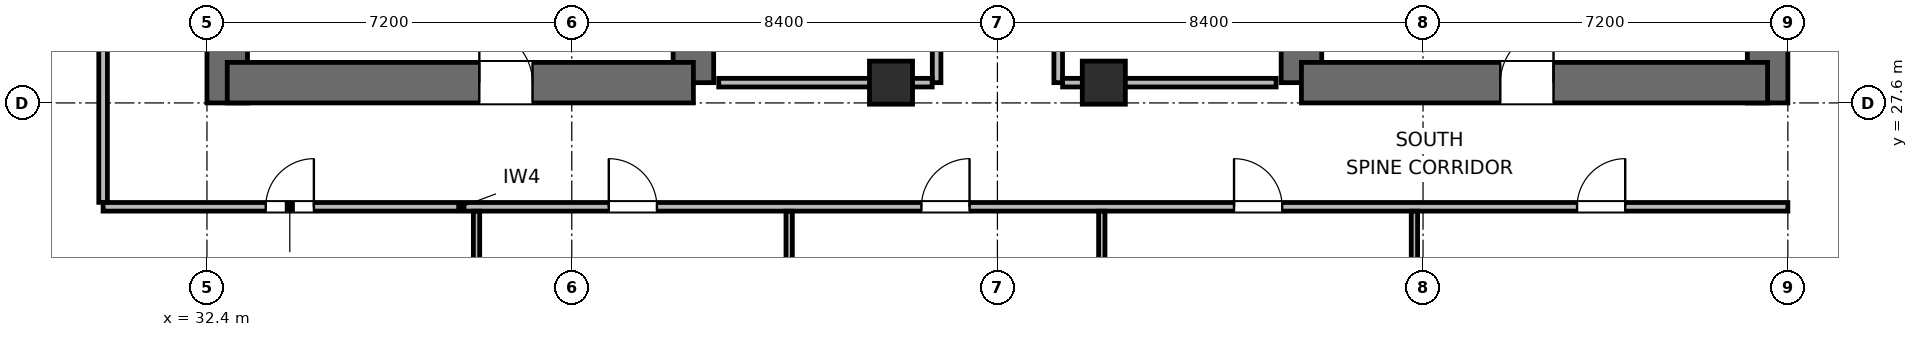
"""IFC4 building model, lengths in metres.
Left out: names, types, materials, properties, quantities, classifications, styles, units other than length and angle.
Written with IfcOpenShell. Run it as: python <this file> out.ifc"""

import sys

from ifc_helpers import new_model, si_unit, direction, frame, frame_2d, origin, origin_2d, place, context, subcontext, project, spatial, rectangle, extrude, element, fill, save


model = new_model("IFC4")
c1 = context("Model", 3, precision=1e-05, world=origin(), true_north=direction((0.0, 1.0)))
c2 = subcontext(c1, "Body", "Model", "MODEL_VIEW")
j1 = project(units=[si_unit("LENGTHUNIT", "METRE"), si_unit("PLANEANGLEUNIT", "RADIAN")], contexts=[c1])
p1 = place(None, origin())
s1 = spatial("IfcSite", under=j1, at=p1, CompositionType="ELEMENT")
p2 = place(p1, origin())
s2 = spatial("IfcBuilding", under=s1, at=p2, CompositionType="ELEMENT")
p3 = place(p2, frame((0.0, 0.0, 141.6)))
s3 = spatial("IfcBuildingStorey", under=s2, at=p3, CompositionType="ELEMENT", Elevation=141.6)
p4 = place(p3, frame((32.8, 27.6, 0.0), z_axis=(0.0, 0.0, 1.0), x_axis=(0.0, 1.0, 0.0)))
e1 = element("IfcWall", 1, at=p4, inside=s3, PredefinedType="SHEAR", context=c2, shape_type="SweptSolid", body=[
    extrude(rectangle(XDim=16.8, YDim=0.8, at=frame_2d((8.4, 0.0))), origin(), (0.0, 0.0, 1.0), 3.9),
])
p5 = place(p3, frame((42.0, 28.0, 0.0), z_axis=(0.0, 0.0, 1.0), x_axis=(0.0, 1.0, 0.0)))
e2 = element("IfcWall", 2, at=p5, inside=s3, PredefinedType="SHEAR", context=c2, shape_type="SweptSolid", body=[
    extrude(rectangle(XDim=6.4, YDim=0.8, at=frame_2d((3.2, 0.0))), origin(), (0.0, 0.0, 1.0), 3.9),
])
p6 = place(p3, frame((32.8, 28.0, 0.0), z_axis=(0.0, 0.0, 1.0), x_axis=(1.0, 0.0, 0.0)))
e3 = element("IfcWall", 3, at=p6, inside=s3, PredefinedType="SHEAR", context=c2, shape_type="SweptSolid", body=[
    extrude(rectangle(XDim=9.2, YDim=0.8, at=frame_2d((4.6, 0.0))), origin(), (0.0, 0.0, 1.0), 3.9),
])
p7 = place(p6, frame((4.975, 0.0, 0.0)))
e4 = element("IfcOpeningElement", 4, at=p7, cuts=e3, PredefinedType="OPENING", context=c2, shape_type="SweptSolid", body=[
    extrude(rectangle(XDim=1.05, YDim=2.04, at=frame_2d((0.525, 1.02))), frame((0.0, 0.41, 0.0), z_axis=(0.0, -1.0, 0.0), x_axis=(1.0, 0.0, 0.0)), (0.0, 0.0, 1.0), 0.82),
])
p8 = place(p3, frame((54.0, 28.0, 0.0), z_axis=(0.0, 0.0, 1.0), x_axis=(0.0, 1.0, 0.0)))
e5 = element("IfcWall", 5, at=p8, inside=s3, PredefinedType="SHEAR", context=c2, shape_type="SweptSolid", body=[
    extrude(rectangle(XDim=7.8, YDim=0.8, at=frame_2d((3.9, 0.0))), origin(), (0.0, 0.0, 1.0), 3.9),
])
p9 = place(p3, frame((63.2, 27.6, 0.0), z_axis=(0.0, 0.0, 1.0), x_axis=(0.0, 1.0, 0.0)))
e6 = element("IfcWall", 6, at=p9, inside=s3, PredefinedType="SHEAR", context=c2, shape_type="SweptSolid", body=[
    extrude(rectangle(XDim=16.8, YDim=0.8, at=frame_2d((8.4, 0.0))), origin(), (0.0, 0.0, 1.0), 3.9),
])
p10 = place(p3, frame((54.0, 28.0, 0.0), z_axis=(0.0, 0.0, 1.0), x_axis=(1.0, 0.0, 0.0)))
e7 = element("IfcWall", 7, at=p10, inside=s3, PredefinedType="SHEAR", context=c2, shape_type="SweptSolid", body=[
    extrude(rectangle(XDim=9.2, YDim=0.8, at=frame_2d((4.6, 0.0))), origin(), (0.0, 0.0, 1.0), 3.9),
])
p11 = place(p10, frame((3.925, 0.0, 0.0)))
e8 = element("IfcOpeningElement", 8, at=p11, cuts=e7, PredefinedType="OPENING", context=c2, shape_type="SweptSolid", body=[
    extrude(rectangle(XDim=1.05, YDim=2.04, at=frame_2d((0.525, 1.02))), frame((0.0, 0.41, 0.0), z_axis=(0.0, -1.0, 0.0), x_axis=(1.0, 0.0, 0.0)), (0.0, 0.0, 1.0), 0.82),
])
for number, where, z_axis, x_axis in (
    (9, (45.9, 28.0, 0.0), (0.0, 0.0, 1.0), (1.0, 0.0, 0.0)),
    (10, (50.1, 28.0, 0.0), (0.0, 0.0, 1.0), (1.0, 0.0, 0.0)),
):
    element("IfcColumn", number, at=place(p3, frame(where, z_axis=z_axis, x_axis=x_axis)), inside=s3, PredefinedType="COLUMN", context=c2, shape_type="SweptSolid", body=[
        extrude(rectangle(XDim=0.85, YDim=0.85, at=origin_2d()), origin(), (0.0, 0.0, 1.0), 3.9),
    ])
p12 = place(p3, frame((46.8, 28.0, 0.0), z_axis=(0.0, 0.0, 1.0), x_axis=(0.0, 1.0, 0.0)))
e11 = element("IfcWall", 11, at=p12, inside=s3, PredefinedType="PARTITIONING", context=c2, shape_type="SweptSolid", body=[
    extrude(rectangle(XDim=4.5, YDim=0.17, at=frame_2d((2.25, 0.0))), origin(), (0.0, 0.0, 1.0), 3.6),
])
p13 = place(p12, frame((0.675, 0.0, 0.0)))
e12 = element("IfcOpeningElement", 12, at=p13, cuts=e11, PredefinedType="OPENING", context=c2, shape_type="SweptSolid", body=[
    extrude(rectangle(XDim=0.9, YDim=2.02, at=frame_2d((0.45, 1.01))), frame((0.0, 0.095, 0.0), z_axis=(0.0, -1.0, 0.0), x_axis=(1.0, 0.0, 0.0)), (0.0, 0.0, 1.0), 0.19),
])
p14 = place(p12, frame((2.925, 0.0, 0.0)))
e13 = element("IfcOpeningElement", 13, at=p14, cuts=e11, PredefinedType="OPENING", context=c2, shape_type="SweptSolid", body=[
    extrude(rectangle(XDim=0.9, YDim=2.02, at=frame_2d((0.45, 1.01))), frame((0.0, 0.095, 0.0), z_axis=(0.0, -1.0, 0.0), x_axis=(1.0, 0.0, 0.0)), (0.0, 0.0, 1.0), 0.19),
])
p15 = place(p3, frame((42.5, 28.0, 0.0), z_axis=(0.0, 0.0, 1.0), x_axis=(1.0, 0.0, 0.0)))
e14 = element("IfcWall", 14, at=p15, inside=s3, PredefinedType="PARTITIONING", context=c2, shape_type="SweptSolid", body=[
    extrude(rectangle(XDim=4.213, YDim=0.17, at=frame_2d((2.106, 0.0))), origin(), (0.0, 0.0, 1.0), 2.485),
])
p16 = place(p3, frame((49.2, 28.0, 0.0), z_axis=(0.0, 0.0, 1.0), x_axis=(0.0, 1.0, 0.0)))
e15 = element("IfcWall", 15, at=p16, inside=s3, PredefinedType="PARTITIONING", context=c2, shape_type="SweptSolid", body=[
    extrude(rectangle(XDim=4.5, YDim=0.17, at=frame_2d((2.25, 0.0))), origin(), (0.0, 0.0, 1.0), 3.6),
])
p17 = place(p16, frame((1.8, 0.0, 0.0)))
e16 = element("IfcOpeningElement", 16, at=p17, cuts=e15, PredefinedType="OPENING", context=c2, shape_type="SweptSolid", body=[
    extrude(rectangle(XDim=0.9, YDim=2.02, at=frame_2d((0.45, 1.01))), frame((0.0, 0.095, 0.0), z_axis=(0.0, -1.0, 0.0), x_axis=(1.0, 0.0, 0.0)), (0.0, 0.0, 1.0), 0.19),
])
p18 = place(p3, frame((49.287, 28.0, 0.0), z_axis=(0.0, 0.0, 1.0), x_axis=(1.0, 0.0, 0.0)))
e17 = element("IfcWall", 17, at=p18, inside=s3, PredefinedType="PARTITIONING", context=c2, shape_type="SweptSolid", body=[
    extrude(rectangle(XDim=4.213, YDim=0.17, at=frame_2d((2.106, 0.0))), origin(), (0.0, 0.0, 1.0), 2.485),
])
p19 = place(p3, frame((30.35, 25.55, 0.0), z_axis=(0.0, 0.0, 1.0), x_axis=(1.0, 0.0, 0.0)))
e18 = element("IfcWall", 18, at=p19, inside=s3, PredefinedType="PARTITIONING", context=c2, shape_type="SweptSolid", body=[
    extrude(rectangle(XDim=33.25, YDim=0.17, at=frame_2d((16.625, 0.0))), origin(), (0.0, 0.0, 1.0), 3.6),
])
p20 = place(p19, frame((3.21, 0.0, 0.0)))
e19 = element("IfcOpeningElement", 19, at=p20, cuts=e18, PredefinedType="OPENING", context=c2, shape_type="SweptSolid", body=[
    extrude(rectangle(XDim=0.95, YDim=2.04, at=frame_2d((0.475, 1.02))), frame((0.0, 0.095, 0.0), z_axis=(0.0, -1.0, 0.0), x_axis=(1.0, 0.0, 0.0)), (0.0, 0.0, 1.0), 0.19),
])
p21 = place(p19, frame((9.98, 0.0, 0.0)))
e20 = element("IfcOpeningElement", 20, at=p21, cuts=e18, PredefinedType="OPENING", context=c2, shape_type="SweptSolid", body=[
    extrude(rectangle(XDim=0.95, YDim=2.04, at=frame_2d((0.475, 1.02))), frame((0.0, 0.095, 0.0), z_axis=(0.0, -1.0, 0.0), x_axis=(1.0, 0.0, 0.0)), (0.0, 0.0, 1.0), 0.19),
])
p22 = place(p19, frame((16.15, 0.0, 0.0)))
e21 = element("IfcOpeningElement", 21, at=p22, cuts=e18, PredefinedType="OPENING", context=c2, shape_type="SweptSolid", body=[
    extrude(rectangle(XDim=0.95, YDim=2.04, at=frame_2d((0.475, 1.02))), frame((0.0, 0.095, 0.0), z_axis=(0.0, -1.0, 0.0), x_axis=(1.0, 0.0, 0.0)), (0.0, 0.0, 1.0), 0.19),
])
p23 = place(p19, frame((22.32, 0.0, 0.0)))
e22 = element("IfcOpeningElement", 22, at=p23, cuts=e18, PredefinedType="OPENING", context=c2, shape_type="SweptSolid", body=[
    extrude(rectangle(XDim=0.95, YDim=2.04, at=frame_2d((0.475, 1.02))), frame((0.0, 0.095, 0.0), z_axis=(0.0, -1.0, 0.0), x_axis=(1.0, 0.0, 0.0)), (0.0, 0.0, 1.0), 0.19),
])
p24 = place(p19, frame((29.09, 0.0, 0.0)))
e23 = element("IfcOpeningElement", 23, at=p24, cuts=e18, PredefinedType="OPENING", context=c2, shape_type="SweptSolid", body=[
    extrude(rectangle(XDim=0.95, YDim=2.04, at=frame_2d((0.475, 1.02))), frame((0.0, 0.095, 0.0), z_axis=(0.0, -1.0, 0.0), x_axis=(1.0, 0.0, 0.0)), (0.0, 0.0, 1.0), 0.19),
])
p25 = place(p3, frame((30.35, 25.637, 0.0), z_axis=(0.0, 0.0, 1.0), x_axis=(0.0, 1.0, 0.0)))
e24 = element("IfcWall", 24, at=p25, inside=s3, PredefinedType="PARTITIONING", context=c2, shape_type="SweptSolid", body=[
    extrude(rectangle(XDim=8.763, YDim=0.17, at=frame_2d((4.381, 0.0))), origin(), (0.0, 0.0, 1.0), 3.6),
])
p26 = place(p25, frame((3.863, 0.0, 0.0)))
e25 = element("IfcOpeningElement", 25, at=p26, cuts=e24, PredefinedType="OPENING", context=c2, shape_type="SweptSolid", body=[
    extrude(rectangle(XDim=0.95, YDim=2.04, at=frame_2d((0.475, 1.02))), frame((0.0, 0.095, 0.0), z_axis=(0.0, -1.0, 0.0), x_axis=(1.0, 0.0, 0.0)), (0.0, 0.0, 1.0), 0.19),
])
p27 = place(p3, frame((37.72, 9.915, 0.0), z_axis=(0.0, 0.0, 1.0), x_axis=(0.0, 1.0, 0.0)))
e26 = element("IfcWall", 26, at=p27, inside=s3, PredefinedType="PARTITIONING", context=c2, shape_type="SweptSolid", body=[
    extrude(rectangle(XDim=15.548, YDim=0.125, at=frame_2d((7.774, 0.0))), origin(), (0.0, 0.0, 1.0), 3.6),
])
p28 = place(p3, frame((43.89, 13.575, 0.0), z_axis=(0.0, 0.0, 1.0), x_axis=(0.0, 1.0, 0.0)))
e27 = element("IfcWall", 27, at=p28, inside=s3, PredefinedType="PARTITIONING", context=c2, shape_type="SweptSolid", body=[
    extrude(rectangle(XDim=11.888, YDim=0.125, at=frame_2d((5.944, 0.0))), origin(), (0.0, 0.0, 1.0), 2.963),
])
p29 = place(p3, frame((50.06, 11.515, 0.0), z_axis=(0.0, 0.0, 1.0), x_axis=(0.0, 1.0, 0.0)))
e28 = element("IfcWall", 28, at=p29, inside=s3, PredefinedType="PARTITIONING", context=c2, shape_type="SweptSolid", body=[
    extrude(rectangle(XDim=13.948, YDim=0.125, at=frame_2d((6.974, 0.0))), origin(), (0.0, 0.0, 1.0), 3.6),
])
p30 = place(p3, frame((56.23, 9.915, 0.0), z_axis=(0.0, 0.0, 1.0), x_axis=(0.0, 1.0, 0.0)))
e29 = element("IfcWall", 29, at=p30, inside=s3, PredefinedType="PARTITIONING", context=c2, shape_type="SweptSolid", body=[
    extrude(rectangle(XDim=15.548, YDim=0.125, at=frame_2d((7.774, 0.0))), origin(), (0.0, 0.0, 1.0), 2.135),
])
p31 = place(p7, origin())
e30 = element("IfcDoor", 30, at=p31, inside=s3, OperationType="SINGLE_SWING_LEFT", PredefinedType="DOOR", context=c2, shape_type="SweptSolid", body=[
    extrude(rectangle(XDim=1.05, YDim=2.04, at=frame_2d((0.525, 1.02))), frame((0.0, 0.025, 0.0), z_axis=(0.0, -1.0, 0.0), x_axis=(1.0, 0.0, 0.0)), (0.0, 0.0, 1.0), 0.05),
])
fill(e4, e30)
p32 = place(p11, origin())
e31 = element("IfcDoor", 31, at=p32, inside=s3, OperationType="SINGLE_SWING_RIGHT", PredefinedType="DOOR", context=c2, shape_type="SweptSolid", body=[
    extrude(rectangle(XDim=1.05, YDim=2.04, at=frame_2d((0.525, 1.02))), frame((0.0, 0.025, 0.0), z_axis=(0.0, -1.0, 0.0), x_axis=(1.0, 0.0, 0.0)), (0.0, 0.0, 1.0), 0.05),
])
fill(e8, e31)
p33 = place(p20, origin())
e32 = element("IfcDoor", 32, at=p33, inside=s3, OperationType="SINGLE_SWING_RIGHT", PredefinedType="DOOR", context=c2, shape_type="SweptSolid", body=[
    extrude(rectangle(XDim=0.95, YDim=2.04, at=frame_2d((0.475, 1.02))), frame((0.0, 0.025, 0.0), z_axis=(0.0, -1.0, 0.0), x_axis=(1.0, 0.0, 0.0)), (0.0, 0.0, 1.0), 0.05),
])
fill(e19, e32)
p34 = place(p21, origin())
e33 = element("IfcDoor", 33, at=p34, inside=s3, OperationType="SINGLE_SWING_LEFT", PredefinedType="DOOR", context=c2, shape_type="SweptSolid", body=[
    extrude(rectangle(XDim=0.95, YDim=2.04, at=frame_2d((0.475, 1.02))), frame((0.0, 0.025, 0.0), z_axis=(0.0, -1.0, 0.0), x_axis=(1.0, 0.0, 0.0)), (0.0, 0.0, 1.0), 0.05),
])
fill(e20, e33)
p35 = place(p22, origin())
e34 = element("IfcDoor", 34, at=p35, inside=s3, OperationType="SINGLE_SWING_RIGHT", PredefinedType="DOOR", context=c2, shape_type="SweptSolid", body=[
    extrude(rectangle(XDim=0.95, YDim=2.04, at=frame_2d((0.475, 1.02))), frame((0.0, 0.025, 0.0), z_axis=(0.0, -1.0, 0.0), x_axis=(1.0, 0.0, 0.0)), (0.0, 0.0, 1.0), 0.05),
])
fill(e21, e34)
p36 = place(p23, origin())
e35 = element("IfcDoor", 35, at=p36, inside=s3, OperationType="SINGLE_SWING_LEFT", PredefinedType="DOOR", context=c2, shape_type="SweptSolid", body=[
    extrude(rectangle(XDim=0.95, YDim=2.04, at=frame_2d((0.475, 1.02))), frame((0.0, 0.025, 0.0), z_axis=(0.0, -1.0, 0.0), x_axis=(1.0, 0.0, 0.0)), (0.0, 0.0, 1.0), 0.05),
])
fill(e22, e35)
p37 = place(p24, origin())
e36 = element("IfcDoor", 36, at=p37, inside=s3, OperationType="SINGLE_SWING_RIGHT", PredefinedType="DOOR", context=c2, shape_type="SweptSolid", body=[
    extrude(rectangle(XDim=0.95, YDim=2.04, at=frame_2d((0.475, 1.02))), frame((0.0, 0.025, 0.0), z_axis=(0.0, -1.0, 0.0), x_axis=(1.0, 0.0, 0.0)), (0.0, 0.0, 1.0), 0.05),
])
fill(e23, e36)
save(model, sys.argv[1])
